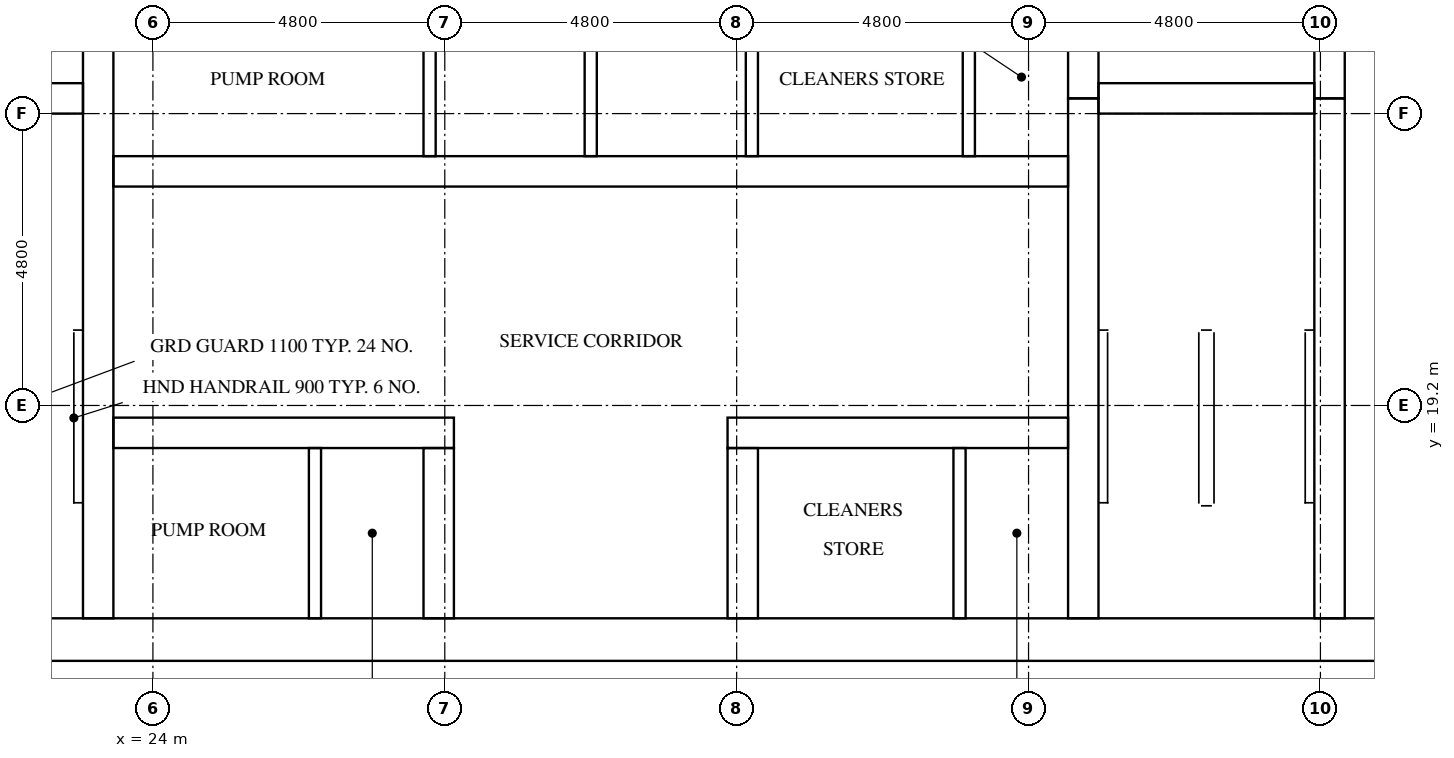
"""IFC4 building model, lengths in metres.
Left out: names, types, materials, properties, quantities, classifications, styles, units other than length and angle.
Written with IfcOpenShell. Run it as: python <this file> out.ifc"""

import sys

from ifc_helpers import new_model, si_unit, direction, frame, frame_2d, origin, place, context, subcontext, project, spatial, rectangle, extrude, element, fill, save


model = new_model("IFC4")
c1 = context("Model", 3, precision=1e-05, world=origin(), true_north=direction((0.0, 1.0)))
c2 = subcontext(c1, "Body", "Model", "MODEL_VIEW")
j1 = project(units=[si_unit("LENGTHUNIT", "METRE"), si_unit("PLANEANGLEUNIT", "RADIAN")], contexts=[c1])
p1 = place(None, origin())
s1 = spatial("IfcSite", under=j1, at=p1, CompositionType="ELEMENT")
p2 = place(p1, origin())
s2 = spatial("IfcBuilding", under=s1, at=p2, CompositionType="ELEMENT")
p3 = place(p2, frame((0.0, 0.0, 192.9)))
s3 = spatial("IfcBuildingStorey", under=s2, at=p3, CompositionType="ELEMENT", Elevation=192.9)
p4 = place(p3, frame((15.0, 15.35, 0.0), z_axis=(0.0, 0.0, 1.0), x_axis=(1.0, 0.0, 0.0)))
e1 = element("IfcWall", 1, at=p4, inside=s3, PredefinedType="SHEAR", context=c2, shape_type="SweptSolid", body=[
    extrude(rectangle(XDim=32.4, YDim=0.7, at=frame_2d((16.2, 0.0))), origin(), (0.0, 0.0, 1.0), 3.2),
])
p5 = place(p4, frame((15.3, 0.0, 0.0)))
e2 = element("IfcOpeningElement", 2, at=p5, cuts=e1, PredefinedType="OPENING", context=c2, shape_type="SweptSolid", body=[
    extrude(rectangle(XDim=1.8, YDim=2.1, at=frame_2d((0.9, 1.05))), frame((0.0, 0.36, 0.0), z_axis=(0.0, -1.0, 0.0), x_axis=(1.0, 0.0, 0.0)), (0.0, 0.0, 1.0), 0.72),
])
p6 = place(p3, frame((23.1, 15.7, 0.0), z_axis=(0.0, 0.0, 1.0), x_axis=(0.0, 1.0, 0.0)))
e3 = element("IfcWall", 3, at=p6, inside=s3, PredefinedType="SHEAR", context=c2, shape_type="SweptSolid", body=[
    extrude(rectangle(XDim=21.4, YDim=0.5, at=frame_2d((10.7, 0.0))), origin(), (0.0, 0.0, 1.0), 3.2),
])
p7 = place(p3, frame((39.3, 15.7, 0.0), z_axis=(0.0, 0.0, 1.0), x_axis=(0.0, 1.0, 0.0)))
e4 = element("IfcWall", 4, at=p7, inside=s3, PredefinedType="SHEAR", context=c2, shape_type="SweptSolid", body=[
    extrude(rectangle(XDim=8.55, YDim=0.5, at=frame_2d((4.275, 0.0))), origin(), (0.0, 0.0, 1.0), 3.2),
])
p8 = place(p3, frame((39.3, 24.25, 0.0), z_axis=(0.0, 0.0, 1.0), x_axis=(0.0, 1.0, 0.0)))
e5 = element("IfcWall", 5, at=p8, inside=s3, PredefinedType="SHEAR", context=c2, shape_type="SweptSolid", body=[
    extrude(rectangle(XDim=3.5, YDim=0.5, at=frame_2d((1.75, 0.0))), origin(), (0.0, 0.0, 1.0), 3.2),
])
p9 = place(p3, frame((43.35, 15.7, 0.0), z_axis=(0.0, 0.0, 1.0), x_axis=(0.0, 1.0, 0.0)))
e6 = element("IfcWall", 6, at=p9, inside=s3, PredefinedType="SHEAR", context=c2, shape_type="SweptSolid", body=[
    extrude(rectangle(XDim=8.55, YDim=0.5, at=frame_2d((4.275, 0.0))), origin(), (0.0, 0.0, 1.0), 3.2),
])
p10 = place(p9, frame((0.5, 0.0, 0.0)))
e7 = element("IfcOpeningElement", 7, at=p10, cuts=e6, PredefinedType="OPENING", context=c2, shape_type="SweptSolid", body=[
    extrude(rectangle(XDim=1.2, YDim=2.1, at=frame_2d((0.6, 1.05))), frame((0.0, 0.26, 0.0), z_axis=(0.0, -1.0, 0.0), x_axis=(1.0, 0.0, 0.0)), (0.0, 0.0, 1.0), 0.52),
])
p11 = place(p3, frame((43.35, 24.25, 0.0), z_axis=(0.0, 0.0, 1.0), x_axis=(0.0, 1.0, 0.0)))
e8 = element("IfcWall", 8, at=p11, inside=s3, PredefinedType="SHEAR", context=c2, shape_type="SweptSolid", body=[
    extrude(rectangle(XDim=3.5, YDim=0.5, at=frame_2d((1.75, 0.0))), origin(), (0.0, 0.0, 1.0), 3.2),
])
p12 = place(p11, frame((1.2, 0.0, 0.0)))
e9 = element("IfcOpeningElement", 9, at=p12, cuts=e8, PredefinedType="OPENING", context=c2, shape_type="SweptSolid", body=[
    extrude(rectangle(XDim=1.1, YDim=2.1, at=frame_2d((0.55, 1.05))), frame((0.0, 0.26, 0.0), z_axis=(0.0, -1.0, 0.0), x_axis=(1.0, 0.0, 0.0)), (0.0, 0.0, 1.0), 0.52),
])
for number, where, z_axis, x_axis in (
    (10, (19.3, 24.25, 0.0), (0.0, 0.0, 1.0), (1.0, 0.0, 0.0)),
    (11, (39.55, 24.25, 0.0), (0.0, 0.0, 1.0), (1.0, 0.0, 0.0)),
):
    element("IfcWall", number, at=place(p3, frame(where, z_axis=z_axis, x_axis=x_axis)), inside=s3, PredefinedType="SHEAR", context=c2, shape_type="SweptSolid", body=[
        extrude(rectangle(XDim=3.55, YDim=0.5, at=frame_2d((1.775, 0.0))), origin(), (0.0, 0.0, 1.0), 3.2),
    ])
p13 = place(p3, frame((23.35, 18.75, 0.0), z_axis=(0.0, 0.0, 1.0), x_axis=(1.0, 0.0, 0.0)))
e12 = element("IfcWall", 12, at=p13, inside=s3, PredefinedType="SHEAR", context=c2, shape_type="SweptSolid", body=[
    extrude(rectangle(XDim=5.6, YDim=0.5, at=frame_2d((2.8, 0.0))), origin(), (0.0, 0.0, 1.0), 3.2),
])
p14 = place(p13, frame((1.107, 0.0, 0.0)))
e13 = element("IfcOpeningElement", 13, at=p14, cuts=e12, PredefinedType="OPENING", context=c2, shape_type="SweptSolid", body=[
    extrude(rectangle(XDim=1.0, YDim=2.1, at=frame_2d((0.5, 1.05))), frame((0.0, 0.26, 0.0), z_axis=(0.0, -1.0, 0.0), x_axis=(1.0, 0.0, 0.0)), (0.0, 0.0, 1.0), 0.52),
])
p15 = place(p13, frame((3.758, 0.0, 0.0)))
e14 = element("IfcOpeningElement", 14, at=p15, cuts=e12, PredefinedType="OPENING", context=c2, shape_type="SweptSolid", body=[
    extrude(rectangle(XDim=1.0, YDim=2.1, at=frame_2d((0.5, 1.05))), frame((0.0, 0.26, 0.0), z_axis=(0.0, -1.0, 0.0), x_axis=(1.0, 0.0, 0.0)), (0.0, 0.0, 1.0), 0.52),
])
p16 = place(p3, frame((33.45, 18.75, 0.0), z_axis=(0.0, 0.0, 1.0), x_axis=(1.0, 0.0, 0.0)))
e15 = element("IfcWall", 15, at=p16, inside=s3, PredefinedType="SHEAR", context=c2, shape_type="SweptSolid", body=[
    extrude(rectangle(XDim=5.6, YDim=0.5, at=frame_2d((2.8, 0.0))), origin(), (0.0, 0.0, 1.0), 3.2),
])
p17 = place(p16, frame((1.607, 0.0, 0.0)))
e16 = element("IfcOpeningElement", 16, at=p17, cuts=e15, PredefinedType="OPENING", context=c2, shape_type="SweptSolid", body=[
    extrude(rectangle(XDim=1.0, YDim=2.1, at=frame_2d((0.5, 1.05))), frame((0.0, 0.26, 0.0), z_axis=(0.0, -1.0, 0.0), x_axis=(1.0, 0.0, 0.0)), (0.0, 0.0, 1.0), 0.52),
])
p18 = place(p16, frame((4.258, 0.0, 0.0)))
e17 = element("IfcOpeningElement", 17, at=p18, cuts=e15, PredefinedType="OPENING", context=c2, shape_type="SweptSolid", body=[
    extrude(rectangle(XDim=1.0, YDim=2.1, at=frame_2d((0.5, 1.05))), frame((0.0, 0.26, 0.0), z_axis=(0.0, -1.0, 0.0), x_axis=(1.0, 0.0, 0.0)), (0.0, 0.0, 1.0), 0.52),
])
p19 = place(p3, frame((23.35, 23.05, 0.0), z_axis=(0.0, 0.0, 1.0), x_axis=(1.0, 0.0, 0.0)))
e18 = element("IfcWall", 18, at=p19, inside=s3, PredefinedType="SHEAR", context=c2, shape_type="SweptSolid", body=[
    extrude(rectangle(XDim=15.7, YDim=0.5, at=frame_2d((7.85, 0.0))), origin(), (0.0, 0.0, 1.0), 3.2),
])
p20 = place(p19, frame((2.05, 0.0, 0.0)))
e19 = element("IfcOpeningElement", 19, at=p20, cuts=e18, PredefinedType="OPENING", context=c2, shape_type="SweptSolid", body=[
    extrude(rectangle(XDim=1.0, YDim=2.1, at=frame_2d((0.5, 1.05))), frame((0.0, 0.26, 0.0), z_axis=(0.0, -1.0, 0.0), x_axis=(1.0, 0.0, 0.0)), (0.0, 0.0, 1.0), 0.52),
])
p21 = place(p19, frame((11.784, 0.0, 0.0)))
e20 = element("IfcOpeningElement", 20, at=p21, cuts=e18, PredefinedType="OPENING", context=c2, shape_type="SweptSolid", body=[
    extrude(rectangle(XDim=1.0, YDim=2.1, at=frame_2d((0.5, 1.05))), frame((0.0, 0.26, 0.0), z_axis=(0.0, -1.0, 0.0), x_axis=(1.0, 0.0, 0.0)), (0.0, 0.0, 1.0), 0.52),
])
p22 = place(p19, frame((14.434, 0.0, 0.0)))
e21 = element("IfcOpeningElement", 21, at=p22, cuts=e18, PredefinedType="OPENING", context=c2, shape_type="SweptSolid", body=[
    extrude(rectangle(XDim=1.0, YDim=2.1, at=frame_2d((0.5, 1.05))), frame((0.0, 0.26, 0.0), z_axis=(0.0, -1.0, 0.0), x_axis=(1.0, 0.0, 0.0)), (0.0, 0.0, 1.0), 0.52),
])
for number, where, z_axis, x_axis in (
    (22, (28.7, 15.7, 0.0), (0.0, 0.0, 1.0), (0.0, 1.0, 0.0)),
    (23, (33.7, 15.7, 0.0), (0.0, 0.0, 1.0), (0.0, 1.0, 0.0)),
):
    element("IfcWall", number, at=place(p3, frame(where, z_axis=z_axis, x_axis=x_axis)), inside=s3, PredefinedType="SHEAR", context=c2, shape_type="SweptSolid", body=[
        extrude(rectangle(XDim=2.8, YDim=0.5, at=frame_2d((1.4, 0.0))), origin(), (0.0, 0.0, 1.0), 3.2),
    ])
for number, where, z_axis, x_axis in (
    (24, (28.55, 23.3, 0.0), (0.0, 0.0, 1.0), (0.0, 1.0, 0.0)),
    (25, (31.2, 23.3, 0.0), (0.0, 0.0, 1.0), (0.0, 1.0, 0.0)),
    (26, (33.85, 23.3, 0.0), (0.0, 0.0, 1.0), (0.0, 1.0, 0.0)),
):
    element("IfcWall", number, at=place(p3, frame(where, z_axis=z_axis, x_axis=x_axis)), inside=s3, PredefinedType="SOLIDWALL", context=c2, shape_type="SweptSolid", body=[
        extrude(rectangle(XDim=2.6, YDim=0.2, at=frame_2d((1.3, 0.0))), origin(), (0.0, 0.0, 1.0), 3.2),
    ])
p23 = place(p3, frame((37.418, 23.3, 0.0), z_axis=(0.0, 0.0, 1.0), x_axis=(0.0, 1.0, 0.0)))
e27 = element("IfcWall", 27, at=p23, inside=s3, PredefinedType="PARTITIONING", context=c2, shape_type="SweptSolid", body=[
    extrude(rectangle(XDim=2.6, YDim=0.2, at=frame_2d((1.3, 0.0))), origin(), (0.0, 0.0, 1.0), 3.2),
])
for number, where, z_axis, x_axis in (
    (28, (26.665, 15.7, 0.0), (0.0, 0.0, 1.0), (0.0, 1.0, 0.0)),
    (29, (37.265, 15.7, 0.0), (0.0, 0.0, 1.0), (0.0, 1.0, 0.0)),
):
    element("IfcWall", number, at=place(p3, frame(where, z_axis=z_axis, x_axis=x_axis)), inside=s3, PredefinedType="PARTITIONING", context=c2, shape_type="SweptSolid", body=[
        extrude(rectangle(XDim=2.8, YDim=0.2, at=frame_2d((1.4, 0.0))), origin(), (0.0, 0.0, 1.0), 3.2),
    ])
p24 = place(p10, origin())
e30 = element("IfcDoor", 30, at=p24, inside=s3, OperationType="SINGLE_SWING_LEFT", PredefinedType="DOOR", context=c2, shape_type="SweptSolid", body=[
    extrude(rectangle(XDim=1.2, YDim=2.1, at=frame_2d((0.6, 1.05))), frame((0.0, 0.025, 0.0), z_axis=(0.0, -1.0, 0.0), x_axis=(1.0, 0.0, 0.0)), (0.0, 0.0, 1.0), 0.05),
])
fill(e7, e30)
p25 = place(p5, frame((1.8, 0.0, 0.0), z_axis=(0.0, 0.0, 1.0), x_axis=(-1.0, 0.0, 0.0)))
e31 = element("IfcDoor", 31, at=p25, inside=s3, OperationType="DOUBLE_DOOR_SINGLE_SWING", PredefinedType="DOOR", context=c2, shape_type="SweptSolid", body=[
    extrude(rectangle(XDim=1.8, YDim=2.1, at=frame_2d((0.9, 1.05))), frame((0.0, 0.025, 0.0), z_axis=(0.0, -1.0, 0.0), x_axis=(1.0, 0.0, 0.0)), (0.0, 0.0, 1.0), 0.05),
])
fill(e2, e31)
p26 = place(p20, frame((1.0, 0.0, 0.0), z_axis=(0.0, 0.0, 1.0), x_axis=(-1.0, 0.0, 0.0)))
e32 = element("IfcDoor", 32, at=p26, inside=s3, OperationType="SINGLE_SWING_LEFT", PredefinedType="DOOR", context=c2, shape_type="SweptSolid", body=[
    extrude(rectangle(XDim=1.0, YDim=2.1, at=frame_2d((0.5, 1.05))), frame((0.0, 0.025, 0.0), z_axis=(0.0, -1.0, 0.0), x_axis=(1.0, 0.0, 0.0)), (0.0, 0.0, 1.0), 0.05),
])
fill(e19, e32)
p27 = place(p21, frame((1.0, 0.0, 0.0), z_axis=(0.0, 0.0, 1.0), x_axis=(-1.0, 0.0, 0.0)))
e33 = element("IfcDoor", 33, at=p27, inside=s3, OperationType="SINGLE_SWING_RIGHT", PredefinedType="DOOR", context=c2, shape_type="SweptSolid", body=[
    extrude(rectangle(XDim=1.0, YDim=2.1, at=frame_2d((0.5, 1.05))), frame((0.0, 0.025, 0.0), z_axis=(0.0, -1.0, 0.0), x_axis=(1.0, 0.0, 0.0)), (0.0, 0.0, 1.0), 0.05),
])
fill(e20, e33)
p28 = place(p22, frame((1.0, 0.0, 0.0), z_axis=(0.0, 0.0, 1.0), x_axis=(-1.0, 0.0, 0.0)))
e34 = element("IfcDoor", 34, at=p28, inside=s3, OperationType="SINGLE_SWING_LEFT", PredefinedType="DOOR", context=c2, shape_type="SweptSolid", body=[
    extrude(rectangle(XDim=1.0, YDim=2.1, at=frame_2d((0.5, 1.05))), frame((0.0, 0.025, 0.0), z_axis=(0.0, -1.0, 0.0), x_axis=(1.0, 0.0, 0.0)), (0.0, 0.0, 1.0), 0.05),
])
fill(e21, e34)
p29 = place(p14, origin())
e35 = element("IfcDoor", 35, at=p29, inside=s3, OperationType="SINGLE_SWING_RIGHT", PredefinedType="DOOR", context=c2, shape_type="SweptSolid", body=[
    extrude(rectangle(XDim=1.0, YDim=2.1, at=frame_2d((0.5, 1.05))), frame((0.0, 0.025, 0.0), z_axis=(0.0, -1.0, 0.0), x_axis=(1.0, 0.0, 0.0)), (0.0, 0.0, 1.0), 0.05),
])
fill(e13, e35)
p30 = place(p15, origin())
e36 = element("IfcDoor", 36, at=p30, inside=s3, OperationType="SINGLE_SWING_LEFT", PredefinedType="DOOR", context=c2, shape_type="SweptSolid", body=[
    extrude(rectangle(XDim=1.0, YDim=2.1, at=frame_2d((0.5, 1.05))), frame((0.0, 0.025, 0.0), z_axis=(0.0, -1.0, 0.0), x_axis=(1.0, 0.0, 0.0)), (0.0, 0.0, 1.0), 0.05),
])
fill(e14, e36)
p31 = place(p17, origin())
e37 = element("IfcDoor", 37, at=p31, inside=s3, OperationType="SINGLE_SWING_RIGHT", PredefinedType="DOOR", context=c2, shape_type="SweptSolid", body=[
    extrude(rectangle(XDim=1.0, YDim=2.1, at=frame_2d((0.5, 1.05))), frame((0.0, 0.025, 0.0), z_axis=(0.0, -1.0, 0.0), x_axis=(1.0, 0.0, 0.0)), (0.0, 0.0, 1.0), 0.05),
])
fill(e16, e37)
p32 = place(p18, origin())
e38 = element("IfcDoor", 38, at=p32, inside=s3, OperationType="SINGLE_SWING_LEFT", PredefinedType="DOOR", context=c2, shape_type="SweptSolid", body=[
    extrude(rectangle(XDim=1.0, YDim=2.1, at=frame_2d((0.5, 1.05))), frame((0.0, 0.025, 0.0), z_axis=(0.0, -1.0, 0.0), x_axis=(1.0, 0.0, 0.0)), (0.0, 0.0, 1.0), 0.05),
])
fill(e17, e38)
save(model, sys.argv[1])
